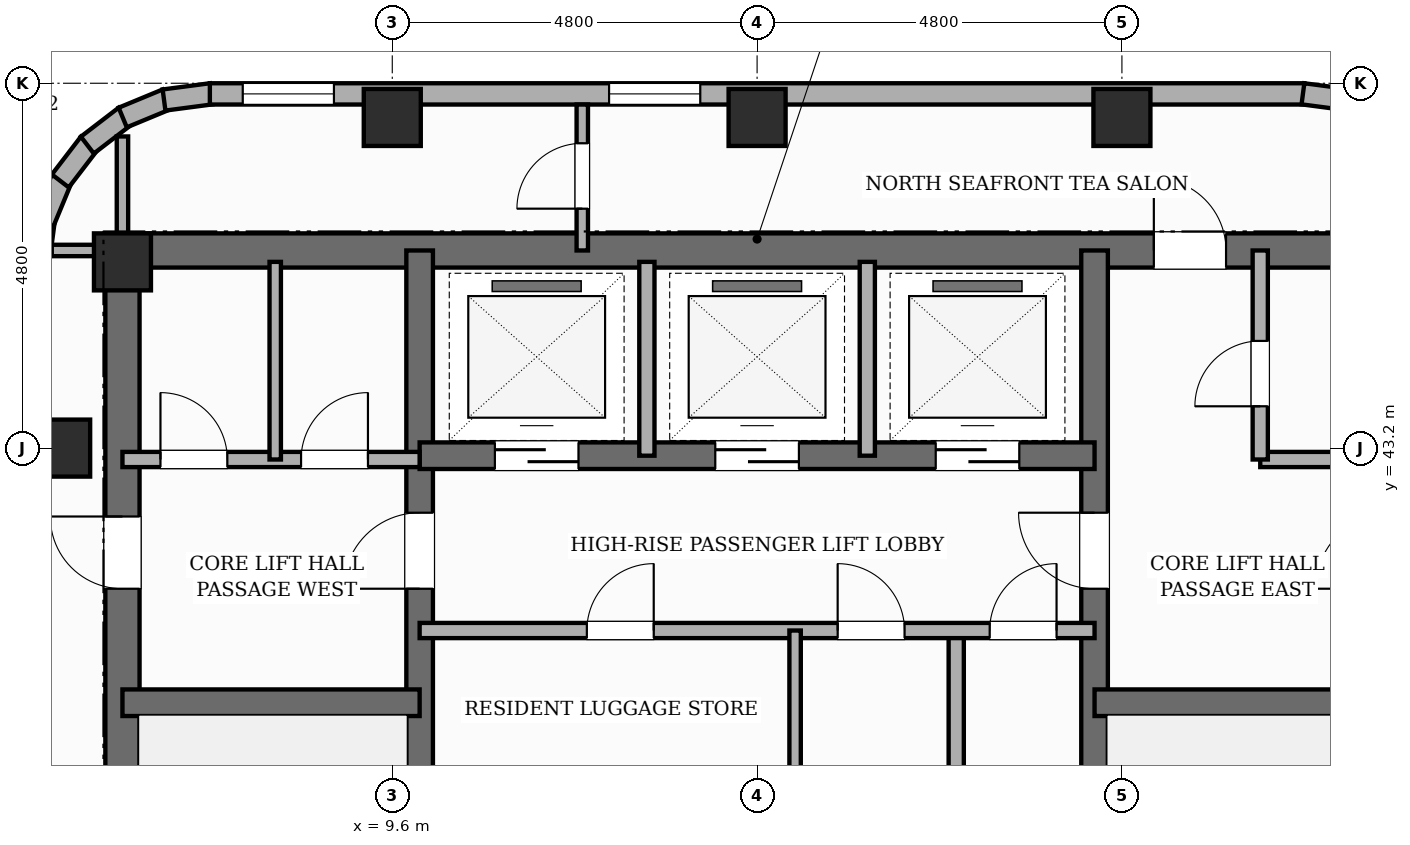
"""IFC4 building model, lengths in metres.
Left out: names, types, materials, properties, quantities, classifications, styles, units other than length and angle.
Written with IfcOpenShell. Run it as: python <this file> out.ifc"""

import sys

from ifc_helpers import new_model, si_unit, direction, frame, frame_2d, origin, origin_2d, place, context, subcontext, project, spatial, rectangle, extrude, element, fill, save


model = new_model("IFC4")
c1 = context("Model", 3, precision=1e-05, world=origin(), true_north=direction((0.0, 1.0)))
c2 = subcontext(c1, "Body", "Model", "MODEL_VIEW")
j1 = project(units=[si_unit("LENGTHUNIT", "METRE"), si_unit("PLANEANGLEUNIT", "RADIAN")], contexts=[c1])
p1 = place(None, origin())
s1 = spatial("IfcSite", under=j1, at=p1, CompositionType="ELEMENT")
p2 = place(p1, origin())
s2 = spatial("IfcBuilding", under=s1, at=p2, CompositionType="ELEMENT")
p3 = place(p2, frame((0.0, 0.0, 278.5)))
s3 = spatial("IfcBuildingStorey", under=s2, at=p3, CompositionType="ELEMENT", Elevation=278.5)
p4 = place(p3, frame((6.05, 30.675, 0.0), z_axis=(0.0, 0.0, 1.0), x_axis=(0.0, 1.0, 0.0)))
e1 = element("IfcWall", 1, at=p4, inside=s3, PredefinedType="SHEAR", context=c2, shape_type="SweptSolid", body=[
    extrude(rectangle(XDim=15.35, YDim=0.45, at=frame_2d((7.675, 0.0))), origin(), (0.0, 0.0, 1.0), 4.3),
])
p5 = place(p4, frame((10.675, 0.0, 0.0)))
e2 = element("IfcOpeningElement", 2, at=p5, cuts=e1, PredefinedType="OPENING", context=c2, shape_type="SweptSolid", body=[
    extrude(rectangle(XDim=0.95, YDim=2.15, at=frame_2d((0.475, 1.075))), frame((0.0, 0.235, 0.0), z_axis=(0.0, -1.0, 0.0), x_axis=(1.0, 0.0, 0.0)), (0.0, 0.0, 1.0), 0.47),
])
p6 = place(p3, frame((6.05, 45.8, 0.0), z_axis=(0.0, 0.0, 1.0), x_axis=(1.0, 0.0, 0.0)))
e3 = element("IfcWall", 3, at=p6, inside=s3, PredefinedType="SHEAR", context=c2, shape_type="SweptSolid", body=[
    extrude(rectangle(XDim=16.7, YDim=0.45, at=frame_2d((8.35, 0.0))), origin(), (0.0, 0.0, 1.0), 4.3),
])
p7 = place(p6, frame((13.57, 0.0, 0.0)))
e4 = element("IfcOpeningElement", 4, at=p7, cuts=e3, PredefinedType="OPENING", context=c2, shape_type="SweptSolid", body=[
    extrude(rectangle(XDim=0.95, YDim=2.15, at=frame_2d((0.475, 1.075))), frame((0.0, 0.235, 0.0), z_axis=(0.0, -1.0, 0.0), x_axis=(1.0, 0.0, 0.0)), (0.0, 0.0, 1.0), 0.47),
])
p8 = place(p3, frame((9.96, 30.9, 0.0), z_axis=(0.0, 0.0, 1.0), x_axis=(0.0, 1.0, 0.0)))
e5 = element("IfcWall", 5, at=p8, inside=s3, PredefinedType="SHEAR", context=c2, shape_type="SweptSolid", body=[
    extrude(rectangle(XDim=14.9, YDim=0.35, at=frame_2d((7.45, 0.0))), origin(), (0.0, 0.0, 1.0), 4.3),
])
p9 = place(p8, frame((0.65, 0.0, 0.0)))
e6 = element("IfcOpeningElement", 6, at=p9, cuts=e5, PredefinedType="OPENING", context=c2, shape_type="SweptSolid", body=[
    extrude(rectangle(XDim=0.95, YDim=2.1, at=frame_2d((0.475, 1.05))), frame((0.0, 0.185, 0.0), z_axis=(0.0, -1.0, 0.0), x_axis=(1.0, 0.0, 0.0)), (0.0, 0.0, 1.0), 0.37),
])
p10 = place(p8, frame((10.45, 0.0, 0.0)))
e7 = element("IfcOpeningElement", 7, at=p10, cuts=e5, PredefinedType="OPENING", context=c2, shape_type="SweptSolid", body=[
    extrude(rectangle(XDim=1.0, YDim=2.15, at=frame_2d((0.5, 1.075))), frame((0.0, 0.185, 0.0), z_axis=(0.0, -1.0, 0.0), x_axis=(1.0, 0.0, 0.0)), (0.0, 0.0, 1.0), 0.37),
])
p11 = place(p3, frame((18.84, 30.9, 0.0), z_axis=(0.0, 0.0, 1.0), x_axis=(0.0, 1.0, 0.0)))
e8 = element("IfcWall", 8, at=p11, inside=s3, PredefinedType="SHEAR", context=c2, shape_type="SweptSolid", body=[
    extrude(rectangle(XDim=14.9, YDim=0.35, at=frame_2d((7.45, 0.0))), origin(), (0.0, 0.0, 1.0), 4.3),
])
p12 = place(p11, frame((0.65, 0.0, 0.0)))
e9 = element("IfcOpeningElement", 9, at=p12, cuts=e8, PredefinedType="OPENING", context=c2, shape_type="SweptSolid", body=[
    extrude(rectangle(XDim=0.95, YDim=2.1, at=frame_2d((0.475, 1.05))), frame((0.0, 0.185, 0.0), z_axis=(0.0, -1.0, 0.0), x_axis=(1.0, 0.0, 0.0)), (0.0, 0.0, 1.0), 0.37),
])
p13 = place(p11, frame((10.45, 0.0, 0.0)))
e10 = element("IfcOpeningElement", 10, at=p13, cuts=e8, PredefinedType="OPENING", context=c2, shape_type="SweptSolid", body=[
    extrude(rectangle(XDim=1.0, YDim=2.15, at=frame_2d((0.5, 1.075))), frame((0.0, 0.185, 0.0), z_axis=(0.0, -1.0, 0.0), x_axis=(1.0, 0.0, 0.0)), (0.0, 0.0, 1.0), 0.37),
])
for number, where, z_axis, x_axis in (
    (11, (6.05, 39.85, 0.0), (0.0, 0.0, 1.0), (1.0, 0.0, 0.0)),
    (12, (18.84, 39.85, 0.0), (0.0, 0.0, 1.0), (1.0, 0.0, 0.0)),
):
    element("IfcWall", number, at=place(p3, frame(where, z_axis=z_axis, x_axis=x_axis)), inside=s3, PredefinedType="SHEAR", context=c2, shape_type="SweptSolid", body=[
        extrude(rectangle(XDim=3.91, YDim=0.35, at=frame_2d((1.955, 0.0))), origin(), (0.0, 0.0, 1.0), 4.3),
    ])
p14 = place(p3, frame((9.96, 43.1, 0.0), z_axis=(0.0, 0.0, 1.0), x_axis=(1.0, 0.0, 0.0)))
e13 = element("IfcWall", 13, at=p14, inside=s3, PredefinedType="SHEAR", context=c2, shape_type="SweptSolid", body=[
    extrude(rectangle(XDim=8.88, YDim=0.35, at=frame_2d((4.44, 0.0))), origin(), (0.0, 0.0, 1.0), 4.3),
])
p15 = place(p14, frame((0.99, 0.0, 0.0)))
e14 = element("IfcOpeningElement", 14, at=p15, cuts=e13, PredefinedType="OPENING", context=c2, shape_type="SweptSolid", body=[
    extrude(rectangle(XDim=1.1, YDim=2.15, at=frame_2d((0.55, 1.075))), frame((0.0, 0.185, 0.0), z_axis=(0.0, -1.0, 0.0), x_axis=(1.0, 0.0, 0.0)), (0.0, 0.0, 1.0), 0.37),
])
p16 = place(p14, frame((3.89, 0.0, 0.0)))
e15 = element("IfcOpeningElement", 15, at=p16, cuts=e13, PredefinedType="OPENING", context=c2, shape_type="SweptSolid", body=[
    extrude(rectangle(XDim=1.1, YDim=2.15, at=frame_2d((0.55, 1.075))), frame((0.0, 0.185, 0.0), z_axis=(0.0, -1.0, 0.0), x_axis=(1.0, 0.0, 0.0)), (0.0, 0.0, 1.0), 0.37),
])
p17 = place(p14, frame((6.79, 0.0, 0.0)))
e16 = element("IfcOpeningElement", 16, at=p17, cuts=e13, PredefinedType="OPENING", context=c2, shape_type="SweptSolid", body=[
    extrude(rectangle(XDim=1.1, YDim=2.15, at=frame_2d((0.55, 1.075))), frame((0.0, 0.185, 0.0), z_axis=(0.0, -1.0, 0.0), x_axis=(1.0, 0.0, 0.0)), (0.0, 0.0, 1.0), 0.37),
])
for number, where, z_axis, x_axis in (
    (17, (5.25, 43.2, 0.0), (0.0, 0.0, 1.0), (1.0, 0.0, 0.0)),
    (18, (6.05, 45.65, 0.0), (0.0, 0.0, 1.0), (1.0, 0.0, 0.0)),
    (19, (9.6, 47.55, 0.0), (0.0, 0.0, 1.0), (1.0, 0.0, 0.0)),
    (20, (14.4, 47.55, 0.0), (0.0, 0.0, 1.0), (1.0, 0.0, 0.0)),
    (21, (19.2, 47.55, 0.0), (0.0, 0.0, 1.0), (1.0, 0.0, 0.0)),
):
    element("IfcColumn", number, at=place(p3, frame(where, z_axis=z_axis, x_axis=x_axis)), inside=s3, PredefinedType="COLUMN", context=c2, shape_type="SweptSolid", body=[
        extrude(rectangle(XDim=0.75, YDim=0.75, at=origin_2d()), origin(), (0.0, 0.0, 1.0), 4.3),
    ])
for number, where, z_axis, x_axis in (
    (22, (4.939, 45.582, 0.0), (0.0, 0.0, 1.0), (0.131, 0.991, 0.0)),
    (23, (5.011, 46.167, 0.0), (0.0, 0.0, 1.0), (0.383, 0.924, 0.0)),
    (24, (5.233, 46.715, 0.0), (0.0, 0.0, 1.0), (0.609, 0.793, 0.0)),
    (25, (5.588, 47.186, 0.0), (0.0, 0.0, 1.0), (0.793, 0.609, 0.0)),
):
    element("IfcWall", number, at=place(p3, frame(where, z_axis=z_axis, x_axis=x_axis)), inside=s3, PredefinedType="STANDARD", context=c2, shape_type="SweptSolid", body=[
        extrude(rectangle(XDim=0.626, YDim=0.28, at=frame_2d((0.313, 0.0))), origin(), (0.0, 0.0, 1.0), 4.04),
    ])
p18 = place(p3, frame((6.054, 47.549, 0.0), z_axis=(0.0, 0.0, 1.0), x_axis=(0.923974080304, 0.382455093999, 0.0)))
e26 = element("IfcWall", 26, at=p18, inside=s3, PredefinedType="STANDARD", context=c2, shape_type="SweptSolid", body=[
    extrude(rectangle(XDim=0.626, YDim=0.28, at=frame_2d((0.313, 0.0))), origin(), (0.0, 0.0, 1.0), 4.04),
])
p19 = place(p3, frame((6.597, 47.779, 0.0), z_axis=(0.0, 0.0, 1.0), x_axis=(0.9914410257, 0.130555323746, 0.0)))
e27 = element("IfcWall", 27, at=p19, inside=s3, PredefinedType="STANDARD", context=c2, shape_type="SweptSolid", body=[
    extrude(rectangle(XDim=0.626, YDim=0.28, at=frame_2d((0.313, 0.0))), origin(), (0.0, 0.0, 1.0), 4.04),
])
p20 = place(p3, frame((7.2, 47.86, 0.0), z_axis=(0.0, 0.0, 1.0), x_axis=(1.0, 0.0, 0.0)))
e28 = element("IfcWall", 28, at=p20, inside=s3, PredefinedType="STANDARD", context=c2, shape_type="SweptSolid", body=[
    extrude(rectangle(XDim=14.4, YDim=0.28, at=frame_2d((7.2, 0.0))), origin(), (0.0, 0.0, 1.0), 3.32),
])
p21 = place(p20, frame((0.433, 0.0, 0.8)))
e29 = element("IfcOpeningElement", 29, at=p21, cuts=e28, PredefinedType="OPENING", context=c2, shape_type="SweptSolid", body=[
    extrude(rectangle(XDim=1.2, YDim=1.8, at=frame_2d((0.6, 0.9))), frame((0.0, 0.15, 0.0), z_axis=(0.0, -1.0, 0.0), x_axis=(1.0, 0.0, 0.0)), (0.0, 0.0, 1.0), 0.3),
])
p22 = place(p20, frame((5.252, 0.0, 0.8)))
e30 = element("IfcOpeningElement", 30, at=p22, cuts=e28, PredefinedType="OPENING", context=c2, shape_type="SweptSolid", body=[
    extrude(rectangle(XDim=1.2, YDim=1.8, at=frame_2d((0.6, 0.9))), frame((0.0, 0.15, 0.0), z_axis=(0.0, -1.0, 0.0), x_axis=(1.0, 0.0, 0.0)), (0.0, 0.0, 1.0), 0.3),
])
p23 = place(p3, frame((21.582, 47.861, 0.0), z_axis=(0.0, 0.0, 1.0), x_axis=(0.9914410257, -0.130555323746, 0.0)))
e31 = element("IfcWall", 31, at=p23, inside=s3, PredefinedType="STANDARD", context=c2, shape_type="SweptSolid", body=[
    extrude(rectangle(XDim=0.626, YDim=0.28, at=frame_2d((0.313, 0.0))), origin(), (0.0, 0.0, 1.0), 3.32),
])
p24 = place(p3, frame((17.02, 35.65, 0.0), z_axis=(0.0, 0.0, 1.0), x_axis=(0.0, 1.0, 0.0)))
e32 = element("IfcWall", 32, at=p24, inside=s3, PredefinedType="POLYGONAL", context=c2, shape_type="SweptSolid", body=[
    extrude(rectangle(XDim=5.15, YDim=0.2, at=frame_2d((2.575, 0.0))), origin(), (0.0, 0.0, 1.0), 4.04),
])
p25 = place(p3, frame((9.96, 40.8, 0.0), z_axis=(0.0, 0.0, 1.0), x_axis=(1.0, 0.0, 0.0)))
e33 = element("IfcWall", 33, at=p25, inside=s3, PredefinedType="POLYGONAL", context=c2, shape_type="SweptSolid", body=[
    extrude(rectangle(XDim=8.88, YDim=0.2, at=frame_2d((4.44, 0.0))), origin(), (0.0, 0.0, 1.0), 4.04),
])
p26 = place(p25, frame((7.5, 0.0, 0.0)))
e34 = element("IfcOpeningElement", 34, at=p26, cuts=e33, PredefinedType="OPENING", context=c2, shape_type="SweptSolid", body=[
    extrude(rectangle(XDim=0.88, YDim=2.1, at=frame_2d((0.44, 1.05))), frame((0.0, 0.11, 0.0), z_axis=(0.0, -1.0, 0.0), x_axis=(1.0, 0.0, 0.0)), (0.0, 0.0, 1.0), 0.22),
])
p27 = place(p25, frame((2.2, 0.0, 0.0)))
e35 = element("IfcOpeningElement", 35, at=p27, cuts=e33, PredefinedType="OPENING", context=c2, shape_type="SweptSolid", body=[
    extrude(rectangle(XDim=0.88, YDim=2.1, at=frame_2d((0.44, 1.05))), frame((0.0, 0.11, 0.0), z_axis=(0.0, -1.0, 0.0), x_axis=(1.0, 0.0, 0.0)), (0.0, 0.0, 1.0), 0.22),
])
p28 = place(p25, frame((5.5, 0.0, 0.0)))
e36 = element("IfcOpeningElement", 36, at=p28, cuts=e33, PredefinedType="OPENING", context=c2, shape_type="SweptSolid", body=[
    extrude(rectangle(XDim=0.88, YDim=2.1, at=frame_2d((0.44, 1.05))), frame((0.0, 0.11, 0.0), z_axis=(0.0, -1.0, 0.0), x_axis=(1.0, 0.0, 0.0)), (0.0, 0.0, 1.0), 0.22),
])
p29 = place(p3, frame((21.02, 43.05, 0.0), z_axis=(0.0, 0.0, 1.0), x_axis=(1.0, 0.0, 0.0)))
e37 = element("IfcWall", 37, at=p29, inside=s3, PredefinedType="POLYGONAL", context=c2, shape_type="SweptSolid", body=[
    extrude(rectangle(XDim=1.73, YDim=0.2, at=frame_2d((0.865, 0.0))), origin(), (0.0, 0.0, 1.0), 3.32),
])
p30 = place(p3, frame((21.02, 43.05, 0.0), z_axis=(0.0, 0.0, 1.0), x_axis=(0.0, 1.0, 0.0)))
e38 = element("IfcWall", 38, at=p30, inside=s3, PredefinedType="POLYGONAL", context=c2, shape_type="SweptSolid", body=[
    extrude(rectangle(XDim=2.75, YDim=0.2, at=frame_2d((1.375, 0.0))), origin(), (0.0, 0.0, 1.0), 4.04),
])
p31 = place(p30, frame((0.7, 0.0, 0.0)))
e39 = element("IfcOpeningElement", 39, at=p31, cuts=e38, PredefinedType="OPENING", context=c2, shape_type="SweptSolid", body=[
    extrude(rectangle(XDim=0.86, YDim=2.1, at=frame_2d((0.43, 1.05))), frame((0.0, 0.11, 0.0), z_axis=(0.0, -1.0, 0.0), x_axis=(1.0, 0.0, 0.0)), (0.0, 0.0, 1.0), 0.22),
])
p32 = place(p3, frame((6.05, 43.05, 0.0), z_axis=(0.0, 0.0, 1.0), x_axis=(1.0, 0.0, 0.0)))
e40 = element("IfcWall", 40, at=p32, inside=s3, PredefinedType="POLYGONAL", context=c2, shape_type="SweptSolid", body=[
    extrude(rectangle(XDim=3.91, YDim=0.2, at=frame_2d((1.955, 0.0))), origin(), (0.0, 0.0, 1.0), 3.32),
])
p33 = place(p32, frame((0.5, 0.0, 0.0)))
e41 = element("IfcOpeningElement", 41, at=p33, cuts=e40, PredefinedType="OPENING", context=c2, shape_type="SweptSolid", body=[
    extrude(rectangle(XDim=0.88, YDim=2.1, at=frame_2d((0.44, 1.05))), frame((0.0, 0.11, 0.0), z_axis=(0.0, -1.0, 0.0), x_axis=(1.0, 0.0, 0.0)), (0.0, 0.0, 1.0), 0.22),
])
p34 = place(p32, frame((2.35, 0.0, 0.0)))
e42 = element("IfcOpeningElement", 42, at=p34, cuts=e40, PredefinedType="OPENING", context=c2, shape_type="SweptSolid", body=[
    extrude(rectangle(XDim=0.88, YDim=2.1, at=frame_2d((0.44, 1.05))), frame((0.0, 0.11, 0.0), z_axis=(0.0, -1.0, 0.0), x_axis=(1.0, 0.0, 0.0)), (0.0, 0.0, 1.0), 0.22),
])
for number, where, z_axis, x_axis in (
    (43, (12.95, 43.1, 0.0), (0.0, 0.0, 1.0), (0.0, 1.0, 0.0)),
    (44, (15.85, 43.1, 0.0), (0.0, 0.0, 1.0), (0.0, 1.0, 0.0)),
):
    element("IfcWall", number, at=place(p3, frame(where, z_axis=z_axis, x_axis=x_axis)), inside=s3, PredefinedType="POLYGONAL", context=c2, shape_type="SweptSolid", body=[
        extrude(rectangle(XDim=2.55, YDim=0.2, at=frame_2d((1.275, 0.0))), origin(), (0.0, 0.0, 1.0), 4.04),
    ])
p35 = place(p3, frame((8.06, 43.05, 0.0), z_axis=(0.0, 0.0, 1.0), x_axis=(0.0, 1.0, 0.0)))
e45 = element("IfcWall", 45, at=p35, inside=s3, PredefinedType="PARTITIONING", context=c2, shape_type="SweptSolid", body=[
    extrude(rectangle(XDim=2.6, YDim=0.15, at=frame_2d((1.3, 0.0))), origin(), (0.0, 0.0, 1.0), 4.04),
])
p36 = place(p3, frame((14.9, 38.72, 0.0), z_axis=(0.0, 0.0, 1.0), x_axis=(0.0, 1.0, 0.0)))
e46 = element("IfcWall", 46, at=p36, inside=s3, PredefinedType="PARTITIONING", context=c2, shape_type="SweptSolid", body=[
    extrude(rectangle(XDim=2.08, YDim=0.15, at=frame_2d((1.04, 0.0))), origin(), (0.0, 0.0, 1.0), 4.04),
])
p37 = place(p3, frame((5.12, 45.8, 0.0), z_axis=(0.0, 0.0, 1.0), x_axis=(1.0, 0.0, 0.0)))
e47 = element("IfcWall", 47, at=p37, inside=s3, PredefinedType="PARTITIONING", context=c2, shape_type="SweptSolid", body=[
    extrude(rectangle(XDim=0.93, YDim=0.15, at=frame_2d((0.465, 0.0))), origin(), (0.0, 0.0, 1.0), 4.04),
])
p38 = place(p3, frame((6.05, 45.8, 0.0), z_axis=(0.0, 0.0, 1.0), x_axis=(0.0, 1.0, 0.0)))
e48 = element("IfcWall", 48, at=p38, inside=s3, PredefinedType="PARTITIONING", context=c2, shape_type="SweptSolid", body=[
    extrude(rectangle(XDim=1.5, YDim=0.15, at=frame_2d((0.75, 0.0))), origin(), (0.0, 0.0, 1.0), 4.04),
])
p39 = place(p3, frame((12.1, 45.8, 0.0), z_axis=(0.0, 0.0, 1.0), x_axis=(0.0, 1.0, 0.0)))
e49 = element("IfcWall", 49, at=p39, inside=s3, PredefinedType="PARTITIONING", context=c2, shape_type="SweptSolid", body=[
    extrude(rectangle(XDim=1.92, YDim=0.15, at=frame_2d((0.96, 0.0))), origin(), (0.0, 0.0, 1.0), 4.04),
])
p40 = place(p39, frame((0.55, 0.0, 0.0)))
e50 = element("IfcOpeningElement", 50, at=p40, cuts=e49, PredefinedType="OPENING", context=c2, shape_type="SweptSolid", body=[
    extrude(rectangle(XDim=0.86, YDim=2.1, at=frame_2d((0.43, 1.05))), frame((0.0, 0.085, 0.0), z_axis=(0.0, -1.0, 0.0), x_axis=(1.0, 0.0, 0.0)), (0.0, 0.0, 1.0), 0.17),
])
p41 = place(p21, origin())
e51 = element("IfcWindow", 51, at=p41, inside=s3, PartitioningType="SINGLE_PANEL", PredefinedType="WINDOW", context=c2, shape_type="SweptSolid", body=[
    extrude(rectangle(XDim=1.2, YDim=1.8, at=frame_2d((0.6, 0.9))), frame((0.0, 0.03, 0.0), z_axis=(0.0, -1.0, 0.0), x_axis=(1.0, 0.0, 0.0)), (0.0, 0.0, 1.0), 0.06),
])
fill(e29, e51)
p42 = place(p22, origin())
e52 = element("IfcWindow", 52, at=p42, inside=s3, PartitioningType="SINGLE_PANEL", PredefinedType="WINDOW", context=c2, shape_type="SweptSolid", body=[
    extrude(rectangle(XDim=1.2, YDim=1.8, at=frame_2d((0.6, 0.9))), frame((0.0, 0.03, 0.0), z_axis=(0.0, -1.0, 0.0), x_axis=(1.0, 0.0, 0.0)), (0.0, 0.0, 1.0), 0.06),
])
fill(e30, e52)
p43 = place(p26, origin())
e53 = element("IfcDoor", 53, at=p43, inside=s3, OperationType="SINGLE_SWING_RIGHT", PredefinedType="DOOR", context=c2, shape_type="SweptSolid", body=[
    extrude(rectangle(XDim=0.88, YDim=2.1, at=frame_2d((0.44, 1.05))), frame((0.0, 0.025, 0.0), z_axis=(0.0, -1.0, 0.0), x_axis=(1.0, 0.0, 0.0)), (0.0, 0.0, 1.0), 0.05),
])
fill(e34, e53)
p44 = place(p15, origin())
e54 = element("IfcDoor", 54, at=p44, inside=s3, OperationType="SLIDING_TO_LEFT", PredefinedType="DOOR", context=c2, shape_type="SweptSolid", body=[
    extrude(rectangle(XDim=1.1, YDim=2.15, at=frame_2d((0.55, 1.075))), frame((0.0, 0.025, 0.0), z_axis=(0.0, -1.0, 0.0), x_axis=(1.0, 0.0, 0.0)), (0.0, 0.0, 1.0), 0.05),
])
fill(e14, e54)
p45 = place(p16, origin())
e55 = element("IfcDoor", 55, at=p45, inside=s3, OperationType="SLIDING_TO_RIGHT", PredefinedType="DOOR", context=c2, shape_type="SweptSolid", body=[
    extrude(rectangle(XDim=1.1, YDim=2.15, at=frame_2d((0.55, 1.075))), frame((0.0, 0.025, 0.0), z_axis=(0.0, -1.0, 0.0), x_axis=(1.0, 0.0, 0.0)), (0.0, 0.0, 1.0), 0.05),
])
fill(e15, e55)
p46 = place(p17, origin())
e56 = element("IfcDoor", 56, at=p46, inside=s3, OperationType="SLIDING_TO_LEFT", PredefinedType="DOOR", context=c2, shape_type="SweptSolid", body=[
    extrude(rectangle(XDim=1.1, YDim=2.15, at=frame_2d((0.55, 1.075))), frame((0.0, 0.025, 0.0), z_axis=(0.0, -1.0, 0.0), x_axis=(1.0, 0.0, 0.0)), (0.0, 0.0, 1.0), 0.05),
])
fill(e16, e56)
p47 = place(p10, origin())
e57 = element("IfcDoor", 57, at=p47, inside=s3, OperationType="SINGLE_SWING_LEFT", PredefinedType="DOOR", context=c2, shape_type="SweptSolid", body=[
    extrude(rectangle(XDim=1.0, YDim=2.15, at=frame_2d((0.5, 1.075))), frame((0.0, 0.025, 0.0), z_axis=(0.0, -1.0, 0.0), x_axis=(1.0, 0.0, 0.0)), (0.0, 0.0, 1.0), 0.05),
])
fill(e7, e57)
p48 = place(p13, origin())
e58 = element("IfcDoor", 58, at=p48, inside=s3, OperationType="SINGLE_SWING_RIGHT", PredefinedType="DOOR", context=c2, shape_type="SweptSolid", body=[
    extrude(rectangle(XDim=1.0, YDim=2.15, at=frame_2d((0.5, 1.075))), frame((0.0, 0.025, 0.0), z_axis=(0.0, -1.0, 0.0), x_axis=(1.0, 0.0, 0.0)), (0.0, 0.0, 1.0), 0.05),
])
fill(e10, e58)
p49 = place(p7, origin())
e59 = element("IfcDoor", 59, at=p49, inside=s3, OperationType="SINGLE_SWING_LEFT", PredefinedType="DOOR", context=c2, shape_type="SweptSolid", body=[
    extrude(rectangle(XDim=0.95, YDim=2.15, at=frame_2d((0.475, 1.075))), frame((0.0, 0.025, 0.0), z_axis=(0.0, -1.0, 0.0), x_axis=(1.0, 0.0, 0.0)), (0.0, 0.0, 1.0), 0.05),
])
fill(e4, e59)
p50 = place(p5, origin())
e60 = element("IfcDoor", 60, at=p50, inside=s3, OperationType="SINGLE_SWING_RIGHT", PredefinedType="DOOR", context=c2, shape_type="SweptSolid", body=[
    extrude(rectangle(XDim=0.95, YDim=2.15, at=frame_2d((0.475, 1.075))), frame((0.0, 0.025, 0.0), z_axis=(0.0, -1.0, 0.0), x_axis=(1.0, 0.0, 0.0)), (0.0, 0.0, 1.0), 0.05),
])
fill(e2, e60)
p51 = place(p33, origin())
e61 = element("IfcDoor", 61, at=p51, inside=s3, OperationType="SINGLE_SWING_LEFT", PredefinedType="DOOR", context=c2, shape_type="SweptSolid", body=[
    extrude(rectangle(XDim=0.88, YDim=2.1, at=frame_2d((0.44, 1.05))), frame((0.0, 0.025, 0.0), z_axis=(0.0, -1.0, 0.0), x_axis=(1.0, 0.0, 0.0)), (0.0, 0.0, 1.0), 0.05),
])
fill(e41, e61)
p52 = place(p34, origin())
e62 = element("IfcDoor", 62, at=p52, inside=s3, OperationType="SINGLE_SWING_RIGHT", PredefinedType="DOOR", context=c2, shape_type="SweptSolid", body=[
    extrude(rectangle(XDim=0.88, YDim=2.1, at=frame_2d((0.44, 1.05))), frame((0.0, 0.025, 0.0), z_axis=(0.0, -1.0, 0.0), x_axis=(1.0, 0.0, 0.0)), (0.0, 0.0, 1.0), 0.05),
])
fill(e42, e62)
p53 = place(p27, origin())
e63 = element("IfcDoor", 63, at=p53, inside=s3, OperationType="SINGLE_SWING_RIGHT", PredefinedType="DOOR", context=c2, shape_type="SweptSolid", body=[
    extrude(rectangle(XDim=0.88, YDim=2.1, at=frame_2d((0.44, 1.05))), frame((0.0, 0.025, 0.0), z_axis=(0.0, -1.0, 0.0), x_axis=(1.0, 0.0, 0.0)), (0.0, 0.0, 1.0), 0.05),
])
fill(e35, e63)
p54 = place(p28, origin())
e64 = element("IfcDoor", 64, at=p54, inside=s3, OperationType="SINGLE_SWING_LEFT", PredefinedType="DOOR", context=c2, shape_type="SweptSolid", body=[
    extrude(rectangle(XDim=0.88, YDim=2.1, at=frame_2d((0.44, 1.05))), frame((0.0, 0.025, 0.0), z_axis=(0.0, -1.0, 0.0), x_axis=(1.0, 0.0, 0.0)), (0.0, 0.0, 1.0), 0.05),
])
fill(e36, e64)
p55 = place(p31, origin())
e65 = element("IfcDoor", 65, at=p55, inside=s3, OperationType="SINGLE_SWING_LEFT", PredefinedType="DOOR", context=c2, shape_type="SweptSolid", body=[
    extrude(rectangle(XDim=0.86, YDim=2.1, at=frame_2d((0.43, 1.05))), frame((0.0, 0.025, 0.0), z_axis=(0.0, -1.0, 0.0), x_axis=(1.0, 0.0, 0.0)), (0.0, 0.0, 1.0), 0.05),
])
fill(e39, e65)
p56 = place(p40, origin())
e66 = element("IfcDoor", 66, at=p56, inside=s3, OperationType="SINGLE_SWING_LEFT", PredefinedType="DOOR", context=c2, shape_type="SweptSolid", body=[
    extrude(rectangle(XDim=0.86, YDim=2.1, at=frame_2d((0.43, 1.05))), frame((0.0, 0.025, 0.0), z_axis=(0.0, -1.0, 0.0), x_axis=(1.0, 0.0, 0.0)), (0.0, 0.0, 1.0), 0.05),
])
fill(e50, e66)
save(model, sys.argv[1])
